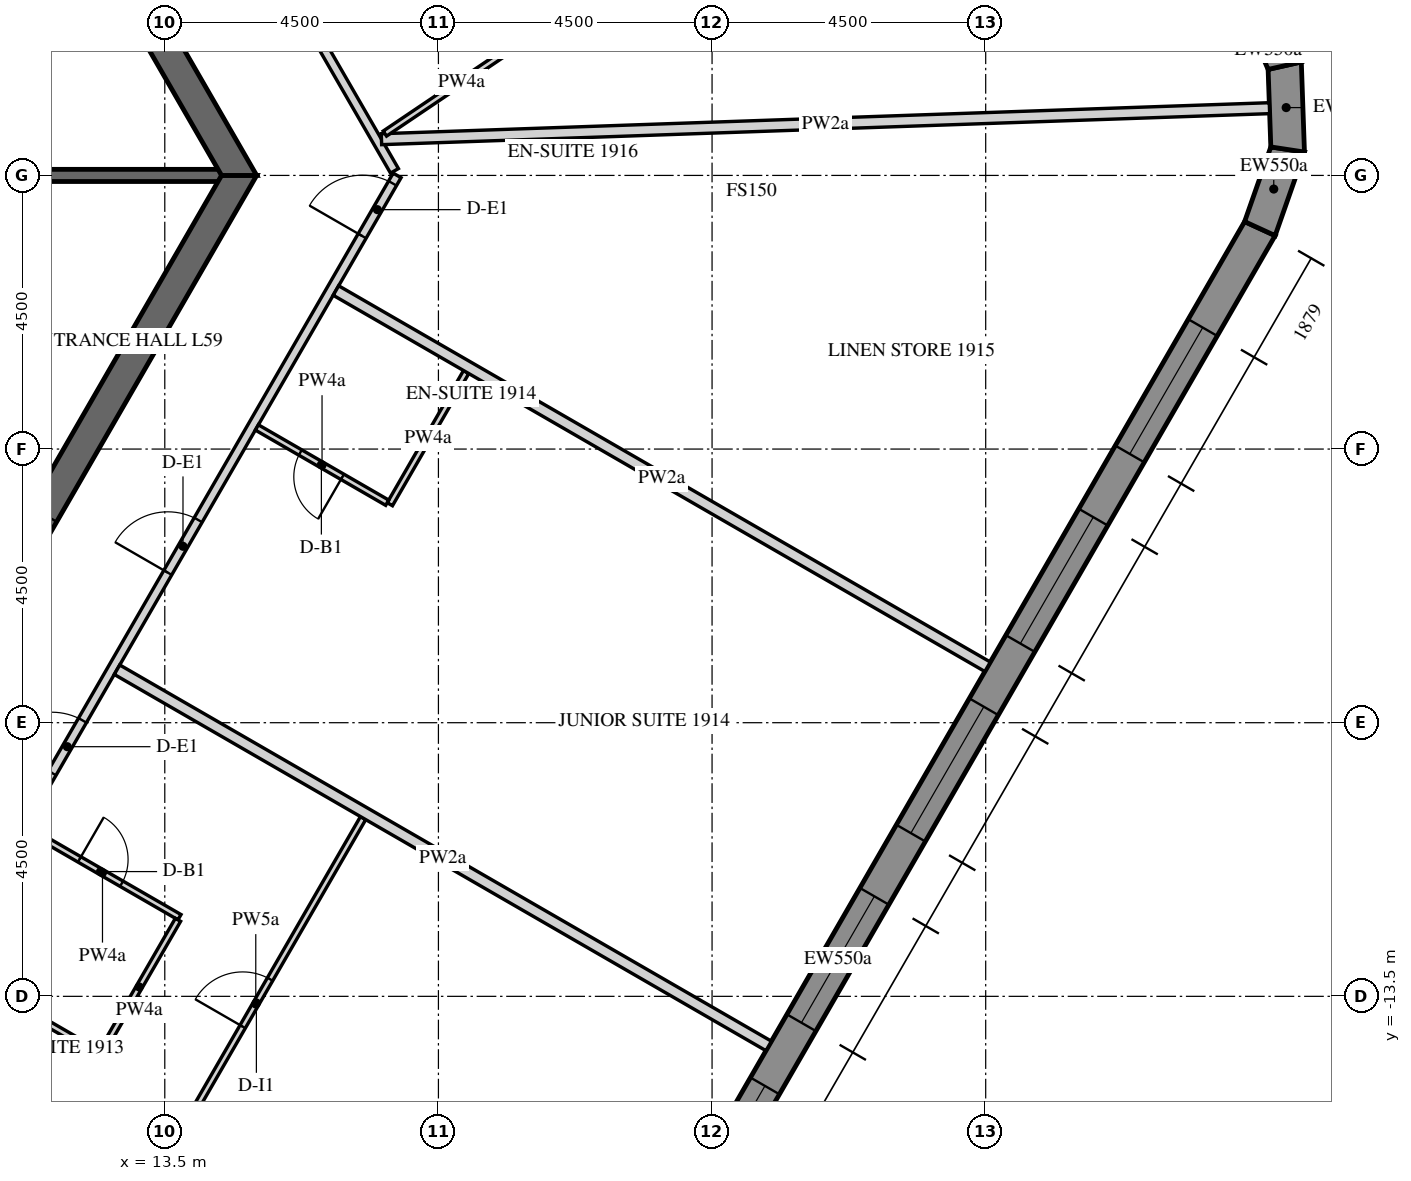
"""IFC4 building model, lengths in metres.
Left out: names, types, materials, properties, quantities, classifications, styles, units other than length and angle.
Written with IfcOpenShell. Run it as: python <this file> out.ifc"""

import sys

from ifc_helpers import new_model, si_unit, direction, frame, frame_2d, origin, place, context, subcontext, project, spatial, polyline, rectangle, outline, extrude, element, fill, save


model = new_model("IFC4")
c1 = context("Model", 3, precision=1e-05, world=origin(), true_north=direction((0.0, 1.0)))
c2 = subcontext(c1, "Body", "Model", "MODEL_VIEW")
j1 = project(units=[si_unit("LENGTHUNIT", "METRE"), si_unit("PLANEANGLEUNIT", "RADIAN")], contexts=[c1])
p1 = place(None, origin())
s1 = spatial("IfcSite", under=j1, at=p1, CompositionType="ELEMENT")
p2 = place(p1, origin())
s2 = spatial("IfcBuilding", under=s1, at=p2, CompositionType="ELEMENT")
p3 = place(p2, frame((0.0, 0.0, 246.3)))
s3 = spatial("IfcBuildingStorey", under=s2, at=p3, CompositionType="ELEMENT", Elevation=246.3)
p4 = place(p3, frame((17.63, -24.914, -0.15), z_axis=(0.0, 0.0, 1.0), x_axis=(0.499998569178, 0.866026229868, 0.0)))
e1 = element("IfcWall", 1, at=p4, inside=s3, PredefinedType="SOLIDWALL", context=c2, shape_type="SweptSolid", body=[
    extrude(outline(polyline([(-0.022, -0.275), (27.783, -0.275), (27.732, 0.275), (0.022, 0.275), (-0.022, -0.275)])), origin(), (0.0, 0.0, 1.0), 3.75),
])
p5 = place(p4, frame((1.879, 0.0, 1.05)))
e2 = element("IfcOpeningElement", 2, at=p5, cuts=e1, PredefinedType="OPENING", context=c2, shape_type="SweptSolid", body=[
    extrude(rectangle(XDim=2.4, YDim=2.4, at=frame_2d((1.2, 1.2))), frame((0.0, 0.285, 0.0), z_axis=(0.0, -1.0, 0.0), x_axis=(1.0, 0.0, 0.0)), (0.0, 0.0, 1.0), 0.57),
])
p6 = place(p4, frame((5.479, 0.0, 1.05)))
e3 = element("IfcOpeningElement", 3, at=p6, cuts=e1, PredefinedType="OPENING", context=c2, shape_type="SweptSolid", body=[
    extrude(rectangle(XDim=2.4, YDim=2.4, at=frame_2d((1.2, 1.2))), frame((0.0, 0.285, 0.0), z_axis=(0.0, -1.0, 0.0), x_axis=(1.0, 0.0, 0.0)), (0.0, 0.0, 1.0), 0.57),
])
p7 = place(p4, frame((9.079, 0.0, 1.05)))
e4 = element("IfcOpeningElement", 4, at=p7, cuts=e1, PredefinedType="OPENING", context=c2, shape_type="SweptSolid", body=[
    extrude(rectangle(XDim=2.4, YDim=2.4, at=frame_2d((1.2, 1.2))), frame((0.0, 0.285, 0.0), z_axis=(0.0, -1.0, 0.0), x_axis=(1.0, 0.0, 0.0)), (0.0, 0.0, 1.0), 0.57),
])
p8 = place(p4, frame((12.679, 0.0, 1.05)))
e5 = element("IfcOpeningElement", 5, at=p8, cuts=e1, PredefinedType="OPENING", context=c2, shape_type="SweptSolid", body=[
    extrude(rectangle(XDim=2.4, YDim=2.4, at=frame_2d((1.2, 1.2))), frame((0.0, 0.285, 0.0), z_axis=(0.0, -1.0, 0.0), x_axis=(1.0, 0.0, 0.0)), (0.0, 0.0, 1.0), 0.57),
])
p9 = place(p4, frame((16.279, 0.0, 1.05)))
e6 = element("IfcOpeningElement", 6, at=p9, cuts=e1, PredefinedType="OPENING", context=c2, shape_type="SweptSolid", body=[
    extrude(rectangle(XDim=2.4, YDim=2.4, at=frame_2d((1.2, 1.2))), frame((0.0, 0.285, 0.0), z_axis=(0.0, -1.0, 0.0), x_axis=(1.0, 0.0, 0.0)), (0.0, 0.0, 1.0), 0.57),
])
p10 = place(p4, frame((19.879, 0.0, 1.05)))
e7 = element("IfcOpeningElement", 7, at=p10, cuts=e1, PredefinedType="OPENING", context=c2, shape_type="SweptSolid", body=[
    extrude(rectangle(XDim=2.4, YDim=2.4, at=frame_2d((1.2, 1.2))), frame((0.0, 0.285, 0.0), z_axis=(0.0, -1.0, 0.0), x_axis=(1.0, 0.0, 0.0)), (0.0, 0.0, 1.0), 0.57),
])
p11 = place(p4, frame((23.479, 0.0, 1.05)))
e8 = element("IfcOpeningElement", 8, at=p11, cuts=e1, PredefinedType="OPENING", context=c2, shape_type="SweptSolid", body=[
    extrude(rectangle(XDim=2.4, YDim=2.4, at=frame_2d((1.2, 1.2))), frame((0.0, 0.285, 0.0), z_axis=(0.0, -1.0, 0.0), x_axis=(1.0, 0.0, 0.0)), (0.0, 0.0, 1.0), 0.57),
])
p12 = place(p3, frame((31.509, -0.875, -0.15), z_axis=(0.0, 0.0, 1.0), x_axis=(0.33111537203, 0.943590276765, 0.0)))
e9 = element("IfcWall", 9, at=p12, inside=s3, PredefinedType="SOLIDWALL", context=c2, shape_type="SweptSolid", body=[
    extrude(outline(polyline([(-0.026, -0.275), (1.431, -0.275), (1.327, 0.275), (0.026, 0.275), (-0.026, -0.275)])), origin(), (0.0, 0.0, 1.0), 3.75),
])
p13 = place(p3, frame((31.966, 0.426, -0.15), z_axis=(0.0, 0.0, 1.0), x_axis=(-0.034876908462, 0.999391615562, 0.0)))
e10 = element("IfcWall", 10, at=p13, inside=s3, PredefinedType="SOLIDWALL", context=c2, shape_type="SweptSolid", body=[
    extrude(outline(polyline([(-0.052, -0.275), (1.431, -0.275), (1.327, 0.275), (0.052, 0.275), (-0.052, -0.275)])), origin(), (0.0, 0.0, 1.0), 3.75),
])
p14 = place(p3, frame((31.917, 1.804, -0.15), z_axis=(0.0, 0.0, 1.0), x_axis=(-0.396225741392, 0.918153125496, 0.0)))
e11 = element("IfcWall", 11, at=p14, inside=s3, PredefinedType="SOLIDWALL", context=c2, shape_type="SweptSolid", body=[
    extrude(outline(polyline([(-0.052, -0.275), (1.405, -0.275), (1.353, 0.275), (0.052, 0.275), (-0.052, -0.275)])), origin(), (0.0, 0.0, 1.0), 3.75),
])
p15 = place(p3, frame((7.361, -12.75, -0.15), z_axis=(0.0, 0.0, 1.0), x_axis=(0.50000571537, 0.866022103989, 0.0)))
e12 = element("IfcWall", 12, at=p15, inside=s3, PredefinedType="SHEAR", context=c2, shape_type="SweptSolid", body=[
    extrude(outline(polyline([(-0.144, -0.25), (14.867, -0.25), (14.578, 0.25), (0.144, 0.25), (-0.144, -0.25)])), origin(), (0.0, 0.0, 1.0), 3.75),
])
p16 = place(p15, frame((6.49, 0.0, 0.15)))
e13 = element("IfcOpeningElement", 13, at=p16, cuts=e12, PredefinedType="OPENING", context=c2, shape_type="SweptSolid", body=[
    extrude(rectangle(XDim=1.8, YDim=2.4, at=frame_2d((0.9, 1.2))), frame((0.0, 0.26, 0.0), z_axis=(0.0, -1.0, 0.0), x_axis=(1.0, 0.0, 0.0)), (0.0, 0.0, 1.0), 0.52),
])
p17 = place(p3, frame((14.722, 0.0, -0.15), z_axis=(0.0, 0.0, 1.0), x_axis=(-0.50000571537, 0.866022103989, 0.0)))
e14 = element("IfcWall", 14, at=p17, inside=s3, PredefinedType="SHEAR", context=c2, shape_type="SweptSolid", body=[
    extrude(outline(polyline([(-0.144, -0.25), (14.867, -0.25), (14.578, 0.25), (0.144, 0.25), (-0.144, -0.25)])), origin(), (0.0, 0.0, 1.0), 3.75),
])
p18 = place(p17, frame((6.432, 0.0, 0.15)))
e15 = element("IfcOpeningElement", 15, at=p18, cuts=e14, PredefinedType="OPENING", context=c2, shape_type="SweptSolid", body=[
    extrude(rectangle(XDim=1.8, YDim=2.4, at=frame_2d((0.9, 1.2))), frame((0.0, 0.26, 0.0), z_axis=(0.0, -1.0, 0.0), x_axis=(1.0, 0.0, 0.0)), (0.0, 0.0, 1.0), 0.52),
])
p19 = place(p3, frame((7.506, -13.0, -0.15), z_axis=(0.0, 0.0, 1.0), x_axis=(0.499988271576, -0.866032175087, 0.0)))
e16 = element("IfcWall", 16, at=p19, inside=s3, PredefinedType="SHEAR", context=c2, shape_type="SweptSolid", body=[
    extrude(rectangle(XDim=15.424, YDim=0.5, at=frame_2d((7.712, 0.0))), origin(), (0.0, 0.0, 1.0), 3.75),
])
p20 = place(p19, frame((6.812, 0.0, 0.15)))
e17 = element("IfcOpeningElement", 17, at=p20, cuts=e16, PredefinedType="OPENING", context=c2, shape_type="SweptSolid", body=[
    extrude(rectangle(XDim=1.8, YDim=2.4, at=frame_2d((0.9, 1.2))), frame((0.0, 0.26, 0.0), z_axis=(0.0, -1.0, 0.0), x_axis=(1.0, 0.0, 0.0)), (0.0, 0.0, 1.0), 0.52),
])
p21 = place(p3, frame((11.547, 0.0, -0.15), z_axis=(0.0, 0.0, 1.0), x_axis=(1.0, 0.0, 0.0)))
e18 = element("IfcWall", 18, at=p21, inside=s3, PredefinedType="SHEAR", context=c2, shape_type="SweptSolid", body=[
    extrude(rectangle(XDim=2.887, YDim=0.2, at=frame_2d((1.443, 0.0))), origin(), (0.0, 0.0, 1.0), 3.75),
])
p22 = place(p3, frame((13.699, -19.628, 0.0), z_axis=(0.0, 0.0, 1.0), x_axis=(-0.499993780622, 0.866028994514, 0.0)))
e19 = element("IfcWall", 19, at=p22, inside=s3, PredefinedType="PARTITIONING", context=c2, shape_type="SweptSolid", body=[
    extrude(rectangle(XDim=7.711, YDim=0.15, at=frame_2d((3.855, 0.0))), origin(), (0.0, 0.0, 1.0), 2.838),
])
p23 = place(p3, frame((9.887, -12.875, 0.0), z_axis=(0.0, 0.0, 1.0), x_axis=(0.499998228944, 0.866026426302, 0.0)))
e20 = element("IfcWall", 20, at=p23, inside=s3, PredefinedType="PARTITIONING", context=c2, shape_type="SweptSolid", body=[
    extrude(rectangle(XDim=14.867, YDim=0.15, at=frame_2d((7.433, 0.0))), origin(), (0.0, 0.0, 1.0), 2.838),
])
p24 = place(p23, frame((3.519, 0.0, 0.0)))
e21 = element("IfcOpeningElement", 21, at=p24, cuts=e20, PredefinedType="OPENING", context=c2, shape_type="SweptSolid", body=[
    extrude(rectangle(XDim=1.0, YDim=2.1, at=frame_2d((0.5, 1.05))), frame((0.0, 0.085, 0.0), z_axis=(0.0, -1.0, 0.0), x_axis=(1.0, 0.0, 0.0)), (0.0, 0.0, 1.0), 0.17),
])
p25 = place(p23, frame((7.324, 0.0, 0.0)))
e22 = element("IfcOpeningElement", 22, at=p25, cuts=e20, PredefinedType="OPENING", context=c2, shape_type="SweptSolid", body=[
    extrude(rectangle(XDim=1.0, YDim=2.1, at=frame_2d((0.5, 1.05))), frame((0.0, 0.085, 0.0), z_axis=(0.0, -1.0, 0.0), x_axis=(1.0, 0.0, 0.0)), (0.0, 0.0, 1.0), 0.17),
])
p26 = place(p23, frame((13.717, 0.0, 0.0)))
e23 = element("IfcOpeningElement", 23, at=p26, cuts=e20, PredefinedType="OPENING", context=c2, shape_type="SweptSolid", body=[
    extrude(rectangle(XDim=1.0, YDim=2.1, at=frame_2d((0.5, 1.05))), frame((0.0, 0.085, 0.0), z_axis=(0.0, -1.0, 0.0), x_axis=(1.0, 0.0, 0.0)), (0.0, 0.0, 1.0), 0.17),
])
p27 = place(p3, frame((17.277, 0.075, 0.0), z_axis=(0.0, 0.0, 1.0), x_axis=(-0.499998228944, 0.866026426302, 0.0)))
e24 = element("IfcWall", 24, at=p27, inside=s3, PredefinedType="PARTITIONING", context=c2, shape_type="SweptSolid", body=[
    extrude(rectangle(XDim=14.867, YDim=0.15, at=frame_2d((7.433, 0.0))), origin(), (0.0, 0.0, 1.0), 2.838),
])
p28 = place(p27, frame((4.345, 0.0, 0.0)))
e25 = element("IfcOpeningElement", 25, at=p28, cuts=e24, PredefinedType="OPENING", context=c2, shape_type="SweptSolid", body=[
    extrude(rectangle(XDim=1.0, YDim=2.1, at=frame_2d((0.5, 1.05))), frame((0.0, 0.085, 0.0), z_axis=(0.0, -1.0, 0.0), x_axis=(1.0, 0.0, 0.0)), (0.0, 0.0, 1.0), 0.17),
])
p29 = place(p27, frame((8.51, 0.0, 0.0)))
e26 = element("IfcOpeningElement", 26, at=p29, cuts=e24, PredefinedType="OPENING", context=c2, shape_type="SweptSolid", body=[
    extrude(rectangle(XDim=1.0, YDim=2.1, at=frame_2d((0.5, 1.05))), frame((0.0, 0.085, 0.0), z_axis=(0.0, -1.0, 0.0), x_axis=(1.0, 0.0, 0.0)), (0.0, 0.0, 1.0), 0.17),
])
p30 = place(p3, frame((11.209, -10.736, 0.0), z_axis=(0.0, 0.0, 1.0), x_axis=(0.866046596414, -0.499963291492, 0.0)))
e27 = element("IfcWall", 27, at=p30, inside=s3, PredefinedType="PARTITIONING", context=c2, shape_type="SweptSolid", body=[
    extrude(rectangle(XDim=2.925, YDim=0.1, at=frame_2d((1.462, 0.0))), origin(), (0.0, 0.0, 1.0), 2.838),
])
p31 = place(p30, frame((1.025, 0.0, 0.0)))
e28 = element("IfcOpeningElement", 28, at=p31, cuts=e27, PredefinedType="OPENING", context=c2, shape_type="SweptSolid", body=[
    extrude(rectangle(XDim=0.8, YDim=2.1, at=frame_2d((0.4, 1.05))), frame((0.0, 0.06, 0.0), z_axis=(0.0, -1.0, 0.0), x_axis=(1.0, 0.0, 0.0)), (0.0, 0.0, 1.0), 0.12),
])
p32 = place(p3, frame((13.717, -12.242, 0.0), z_axis=(0.0, 0.0, 1.0), x_axis=(-0.499990435942, -0.866030925526, 0.0)))
e29 = element("IfcWall", 29, at=p32, inside=s3, PredefinedType="PARTITIONING", context=c2, shape_type="SweptSolid", body=[
    extrude(rectangle(XDim=2.55, YDim=0.1, at=frame_2d((1.275, 0.0))), origin(), (0.0, 0.0, 1.0), 2.838),
])
p33 = place(p3, frame((12.399, -14.425, 0.0), z_axis=(0.0, 0.0, 1.0), x_axis=(-0.866018616679, 0.500011755427, 0.0)))
e30 = element("IfcWall", 30, at=p33, inside=s3, PredefinedType="PARTITIONING", context=c2, shape_type="SweptSolid", body=[
    extrude(rectangle(XDim=2.8, YDim=0.1, at=frame_2d((1.4, 0.0))), origin(), (0.0, 0.0, 1.0), 2.838),
])
p34 = place(p3, frame((13.231, -16.683, 0.0), z_axis=(0.0, 0.0, 1.0), x_axis=(0.499995846692, 0.866027801685, 0.0)))
e31 = element("IfcWall", 31, at=p34, inside=s3, PredefinedType="PARTITIONING", context=c2, shape_type="SweptSolid", body=[
    extrude(rectangle(XDim=7.06, YDim=0.1, at=frame_2d((3.53, 0.0))), origin(), (0.0, 0.0, 1.0), 2.838),
])
p35 = place(p34, frame((3.1, 0.0, 0.0)))
e32 = element("IfcOpeningElement", 32, at=p35, cuts=e31, PredefinedType="OPENING", context=c2, shape_type="SweptSolid", body=[
    extrude(rectangle(XDim=0.9, YDim=2.1, at=frame_2d((0.45, 1.05))), frame((0.0, 0.06, 0.0), z_axis=(0.0, -1.0, 0.0), x_axis=(1.0, 0.0, 0.0)), (0.0, 0.0, 1.0), 0.12),
])
p36 = place(p3, frame((23.431, -14.316, 0.0), z_axis=(0.0, 0.0, 1.0), x_axis=(-0.866024931941, 0.500000817256, 0.0)))
e33 = element("IfcWall", 33, at=p36, inside=s3, PredefinedType="PARTITIONING", context=c2, shape_type="SweptSolid", body=[
    extrude(rectangle(XDim=12.375, YDim=0.18, at=frame_2d((6.188, 0.0))), origin(), (0.0, 0.0, 1.0), 2.838),
])
p37 = place(p3, frame((18.456, -3.233, 0.0), z_axis=(0.0, 0.0, 1.0), x_axis=(-0.500062048339, -0.865989577195, 0.0)))
e34 = element("IfcWall", 34, at=p37, inside=s3, PredefinedType="PARTITIONING", context=c2, shape_type="SweptSolid", body=[
    extrude(rectangle(XDim=2.51, YDim=0.1, at=frame_2d((1.255, 0.0))), origin(), (0.0, 0.0, 1.0), 2.838),
])
p38 = place(p3, frame((17.158, -5.382, 0.0), z_axis=(0.0, 0.0, 1.0), x_axis=(-0.866031185235, 0.4999899861, 0.0)))
e35 = element("IfcWall", 35, at=p38, inside=s3, PredefinedType="PARTITIONING", context=c2, shape_type="SweptSolid", body=[
    extrude(rectangle(XDim=2.475, YDim=0.1, at=frame_2d((1.238, 0.0))), origin(), (0.0, 0.0, 1.0), 2.838),
])
p39 = place(p38, frame((0.85, 0.0, 0.0)))
e36 = element("IfcOpeningElement", 36, at=p39, cuts=e35, PredefinedType="OPENING", context=c2, shape_type="SweptSolid", body=[
    extrude(rectangle(XDim=0.8, YDim=2.1, at=frame_2d((0.4, 1.05))), frame((0.0, 0.06, 0.0), z_axis=(0.0, -1.0, 0.0), x_axis=(1.0, 0.0, 0.0)), (0.0, 0.0, 1.0), 0.12),
])
p40 = place(p3, frame((27.031, -8.08, 0.0), z_axis=(0.0, 0.0, 1.0), x_axis=(-0.866024931941, 0.500000817256, 0.0)))
e37 = element("IfcWall", 37, at=p40, inside=s3, PredefinedType="PARTITIONING", context=c2, shape_type="SweptSolid", body=[
    extrude(rectangle(XDim=12.375, YDim=0.18, at=frame_2d((6.188, 0.0))), origin(), (0.0, 0.0, 1.0), 2.838),
])
p41 = place(p3, frame((31.667, 1.106, 0.0), z_axis=(0.0, 0.0, 1.0), x_axis=(-0.999391305206, -0.034885800543, 0.0)))
e38 = element("IfcWall", 38, at=p41, inside=s3, PredefinedType="PARTITIONING", context=c2, shape_type="SweptSolid", body=[
    extrude(rectangle(XDim=14.612, YDim=0.18, at=frame_2d((7.306, 0.0))), origin(), (0.0, 0.0, 1.0), 2.838),
])
p42 = place(p3, frame((19.642, 2.389, 0.0), z_axis=(0.0, 0.0, 1.0), x_axis=(-0.82902628405, -0.559209639004, 0.0)))
e39 = element("IfcWall", 39, at=p42, inside=s3, PredefinedType="PARTITIONING", context=c2, shape_type="SweptSolid", body=[
    extrude(rectangle(XDim=3.043, YDim=0.1, at=frame_2d((1.521, 0.0))), origin(), (0.0, 0.0, 1.0), 2.838),
])
p43 = place(p7, frame((0.0, 0.205, 0.0)))
e40 = element("IfcWindow", 40, at=p43, inside=s3, PartitioningType="DOUBLE_PANEL_VERTICAL", PredefinedType="WINDOW", context=c2, shape_type="SweptSolid", body=[
    extrude(rectangle(XDim=2.4, YDim=2.4, at=frame_2d((1.2, 1.2))), frame((0.0, 0.03, 0.0), z_axis=(0.0, -1.0, 0.0), x_axis=(1.0, 0.0, 0.0)), (0.0, 0.0, 1.0), 0.06),
])
fill(e4, e40)
p44 = place(p8, frame((0.0, 0.205, 0.0)))
e41 = element("IfcWindow", 41, at=p44, inside=s3, PartitioningType="DOUBLE_PANEL_VERTICAL", PredefinedType="WINDOW", context=c2, shape_type="SweptSolid", body=[
    extrude(rectangle(XDim=2.4, YDim=2.4, at=frame_2d((1.2, 1.2))), frame((0.0, 0.03, 0.0), z_axis=(0.0, -1.0, 0.0), x_axis=(1.0, 0.0, 0.0)), (0.0, 0.0, 1.0), 0.06),
])
fill(e5, e41)
p45 = place(p9, frame((0.0, 0.205, 0.0)))
e42 = element("IfcWindow", 42, at=p45, inside=s3, PartitioningType="DOUBLE_PANEL_VERTICAL", PredefinedType="WINDOW", context=c2, shape_type="SweptSolid", body=[
    extrude(rectangle(XDim=2.4, YDim=2.4, at=frame_2d((1.2, 1.2))), frame((0.0, 0.03, 0.0), z_axis=(0.0, -1.0, 0.0), x_axis=(1.0, 0.0, 0.0)), (0.0, 0.0, 1.0), 0.06),
])
fill(e6, e42)
p46 = place(p10, frame((0.0, 0.205, 0.0)))
e43 = element("IfcWindow", 43, at=p46, inside=s3, PartitioningType="DOUBLE_PANEL_VERTICAL", PredefinedType="WINDOW", context=c2, shape_type="SweptSolid", body=[
    extrude(rectangle(XDim=2.4, YDim=2.4, at=frame_2d((1.2, 1.2))), frame((0.0, 0.03, 0.0), z_axis=(0.0, -1.0, 0.0), x_axis=(1.0, 0.0, 0.0)), (0.0, 0.0, 1.0), 0.06),
])
fill(e7, e43)
p47 = place(p11, frame((0.0, 0.205, 0.0)))
e44 = element("IfcWindow", 44, at=p47, inside=s3, PartitioningType="DOUBLE_PANEL_VERTICAL", PredefinedType="WINDOW", context=c2, shape_type="SweptSolid", body=[
    extrude(rectangle(XDim=2.4, YDim=2.4, at=frame_2d((1.2, 1.2))), frame((0.0, 0.03, 0.0), z_axis=(0.0, -1.0, 0.0), x_axis=(1.0, 0.0, 0.0)), (0.0, 0.0, 1.0), 0.06),
])
fill(e8, e44)
p48 = place(p24, origin())
e45 = element("IfcDoor", 45, at=p48, inside=s3, OperationType="SINGLE_SWING_RIGHT", PredefinedType="DOOR", context=c2, shape_type="SweptSolid", body=[
    extrude(rectangle(XDim=1.0, YDim=2.1, at=frame_2d((0.5, 1.05))), frame((0.0, 0.025, 0.0), z_axis=(0.0, -1.0, 0.0), x_axis=(1.0, 0.0, 0.0)), (0.0, 0.0, 1.0), 0.05),
])
fill(e21, e45)
p49 = place(p31, origin())
e46 = element("IfcDoor", 46, at=p49, inside=s3, OperationType="SINGLE_SWING_RIGHT", PredefinedType="DOOR", context=c2, shape_type="SweptSolid", body=[
    extrude(rectangle(XDim=0.8, YDim=2.1, at=frame_2d((0.4, 1.05))), frame((0.0, 0.025, 0.0), z_axis=(0.0, -1.0, 0.0), x_axis=(1.0, 0.0, 0.0)), (0.0, 0.0, 1.0), 0.05),
])
fill(e28, e46)
p50 = place(p35, origin())
e47 = element("IfcDoor", 47, at=p50, inside=s3, OperationType="SINGLE_SWING_LEFT", PredefinedType="DOOR", context=c2, shape_type="SweptSolid", body=[
    extrude(rectangle(XDim=0.9, YDim=2.1, at=frame_2d((0.45, 1.05))), frame((0.0, 0.025, 0.0), z_axis=(0.0, -1.0, 0.0), x_axis=(1.0, 0.0, 0.0)), (0.0, 0.0, 1.0), 0.05),
])
fill(e32, e47)
p51 = place(p25, origin())
e48 = element("IfcDoor", 48, at=p51, inside=s3, OperationType="SINGLE_SWING_LEFT", PredefinedType="DOOR", context=c2, shape_type="SweptSolid", body=[
    extrude(rectangle(XDim=1.0, YDim=2.1, at=frame_2d((0.5, 1.05))), frame((0.0, 0.025, 0.0), z_axis=(0.0, -1.0, 0.0), x_axis=(1.0, 0.0, 0.0)), (0.0, 0.0, 1.0), 0.05),
])
fill(e22, e48)
p52 = place(p39, origin())
e49 = element("IfcDoor", 49, at=p52, inside=s3, OperationType="SINGLE_SWING_LEFT", PredefinedType="DOOR", context=c2, shape_type="SweptSolid", body=[
    extrude(rectangle(XDim=0.8, YDim=2.1, at=frame_2d((0.4, 1.05))), frame((0.0, 0.025, 0.0), z_axis=(0.0, -1.0, 0.0), x_axis=(1.0, 0.0, 0.0)), (0.0, 0.0, 1.0), 0.05),
])
fill(e36, e49)
p53 = place(p26, origin())
e50 = element("IfcDoor", 50, at=p53, inside=s3, OperationType="SINGLE_SWING_LEFT", PredefinedType="DOOR", context=c2, shape_type="SweptSolid", body=[
    extrude(rectangle(XDim=1.0, YDim=2.1, at=frame_2d((0.5, 1.05))), frame((0.0, 0.025, 0.0), z_axis=(0.0, -1.0, 0.0), x_axis=(1.0, 0.0, 0.0)), (0.0, 0.0, 1.0), 0.05),
])
fill(e23, e50)
save(model, sys.argv[1])
